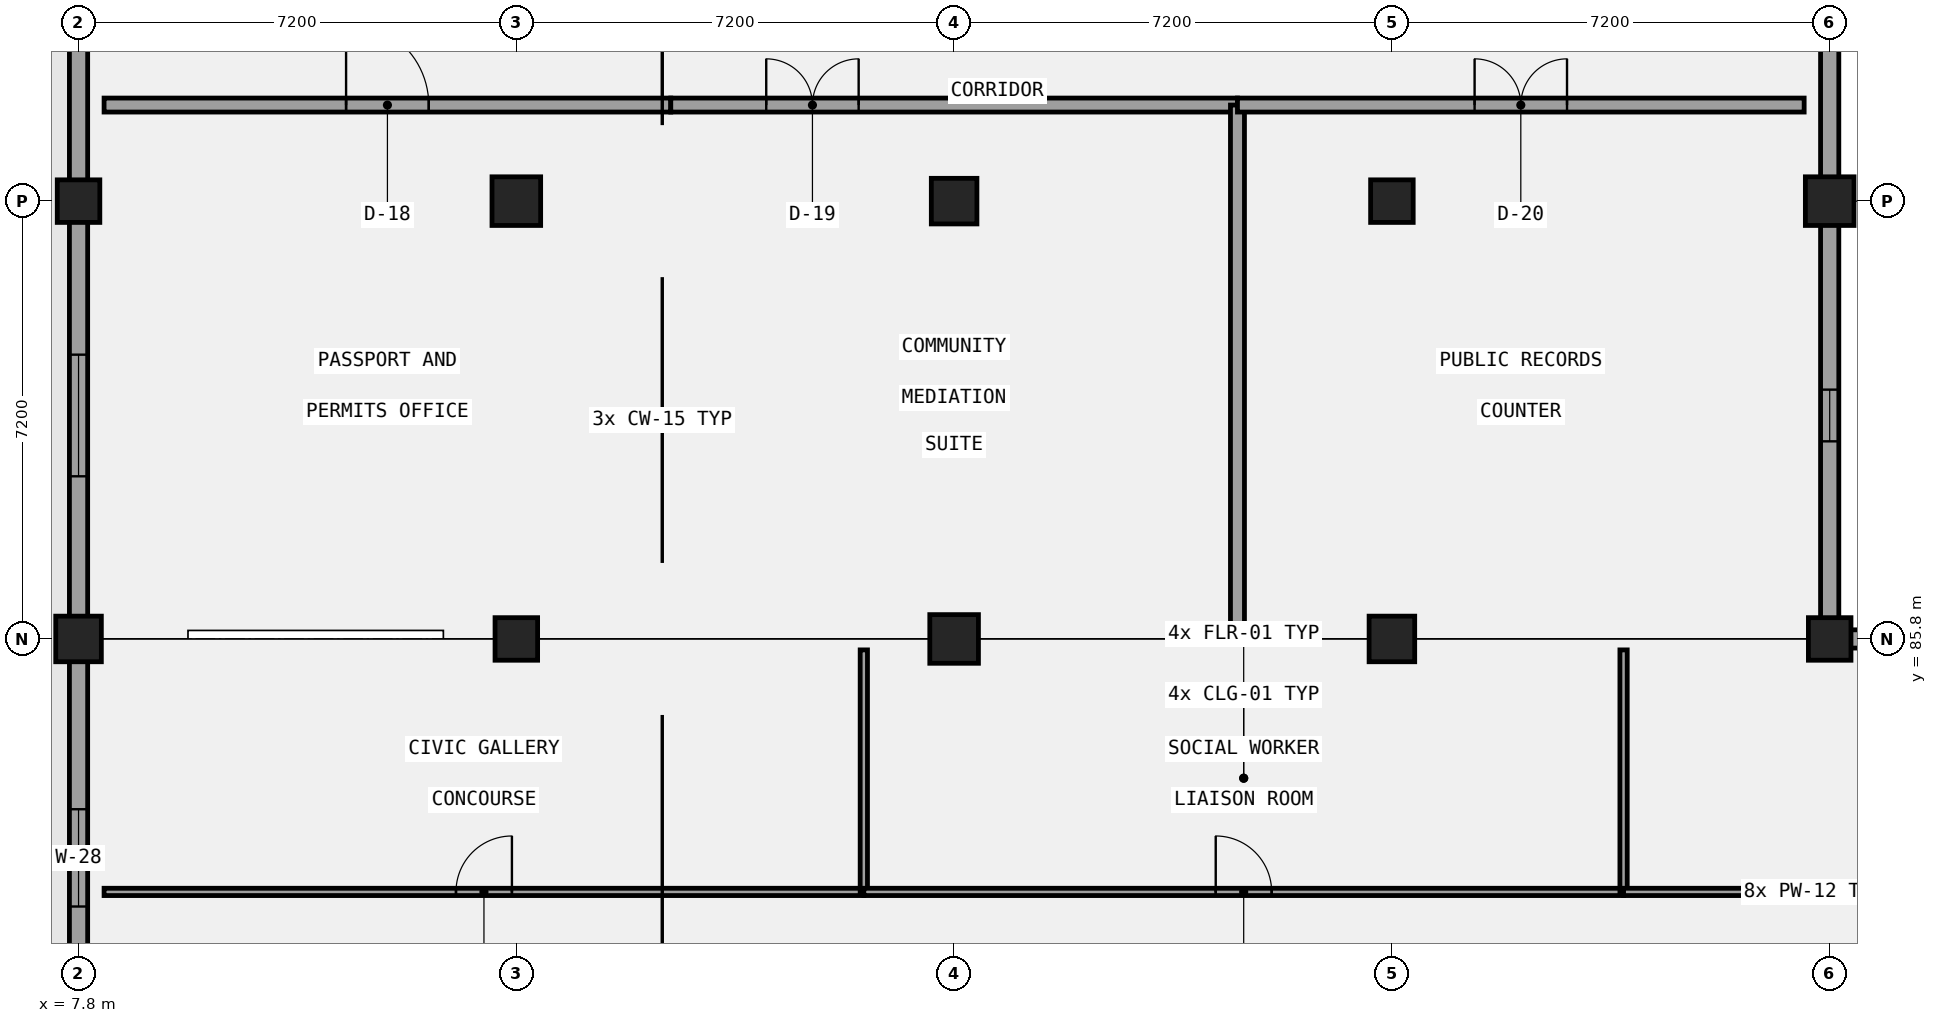
"""IFC4 building model, lengths in metres.
Left out: names, types, materials, properties, quantities, classifications, styles, units other than length and angle.
Written with IfcOpenShell. Run it as: python <this file> out.ifc"""

import sys

from ifc_helpers import new_model, si_unit, direction, frame, frame_2d, origin, origin_2d, place, context, subcontext, project, spatial, rectangle, extrude, element, fill, save


model = new_model("IFC4")
c1 = context("Model", 3, precision=1e-05, world=origin(), true_north=direction((0.0, 1.0)))
c2 = subcontext(c1, "Body", "Model", "MODEL_VIEW")
j1 = project(units=[si_unit("LENGTHUNIT", "METRE"), si_unit("PLANEANGLEUNIT", "RADIAN")], contexts=[c1])
p1 = place(None, origin())
s1 = spatial("IfcSite", under=j1, at=p1, CompositionType="ELEMENT")
p2 = place(p1, origin())
s2 = spatial("IfcBuilding", under=s1, at=p2, CompositionType="ELEMENT")
p3 = place(p2, frame((0.0, 0.0, 5.4)))
s3 = spatial("IfcBuildingStorey", under=s2, at=p3, CompositionType="ELEMENT", Elevation=5.4)
p4 = place(p3, frame((7.8, 85.8, 0.0), z_axis=(0.0, 0.0, 1.0), x_axis=(1.0, 0.0, 0.0)))
e1 = element("IfcColumn", 1, at=p4, inside=s3, PredefinedType="COLUMN", context=c2, shape_type="SweptSolid", body=[
    extrude(rectangle(XDim=0.75, YDim=0.75, at=origin_2d()), origin(), (0.0, 0.0, 1.0), 4.2),
])
for number, where, z_axis, x_axis in (
    (2, (7.8, 93.0, 0.0), (0.0, 0.0, 1.0), (1.0, 0.0, 0.0)),
    (3, (15.0, 85.8, 0.0), (0.0, 0.0, 1.0), (1.0, 0.0, 0.0)),
):
    element("IfcColumn", number, at=place(p3, frame(where, z_axis=z_axis, x_axis=x_axis)), inside=s3, PredefinedType="COLUMN", context=c2, shape_type="SweptSolid", body=[
        extrude(rectangle(XDim=0.7, YDim=0.7, at=origin_2d()), origin(), (0.0, 0.0, 1.0), 4.2),
    ])
for number, where, z_axis, x_axis in (
    (4, (15.0, 93.0, 0.0), (0.0, 0.0, 1.0), (1.0, 0.0, 0.0)),
    (5, (22.2, 85.8, 0.0), (0.0, 0.0, 1.0), (1.0, 0.0, 0.0)),
):
    element("IfcColumn", number, at=place(p3, frame(where, z_axis=z_axis, x_axis=x_axis)), inside=s3, PredefinedType="COLUMN", context=c2, shape_type="SweptSolid", body=[
        extrude(rectangle(XDim=0.8, YDim=0.8, at=origin_2d()), origin(), (0.0, 0.0, 1.0), 4.2),
    ])
for number, where, z_axis, x_axis in (
    (6, (22.2, 93.0, 0.0), (0.0, 0.0, 1.0), (1.0, 0.0, 0.0)),
    (7, (29.4, 85.8, 0.0), (0.0, 0.0, 1.0), (1.0, 0.0, 0.0)),
):
    element("IfcColumn", number, at=place(p3, frame(where, z_axis=z_axis, x_axis=x_axis)), inside=s3, PredefinedType="COLUMN", context=c2, shape_type="SweptSolid", body=[
        extrude(rectangle(XDim=0.75, YDim=0.75, at=origin_2d()), origin(), (0.0, 0.0, 1.0), 4.2),
    ])
for number, where, z_axis, x_axis in (
    (8, (29.4, 93.0, 0.0), (0.0, 0.0, 1.0), (1.0, 0.0, 0.0)),
    (9, (36.6, 85.8, 0.0), (0.0, 0.0, 1.0), (1.0, 0.0, 0.0)),
):
    element("IfcColumn", number, at=place(p3, frame(where, z_axis=z_axis, x_axis=x_axis)), inside=s3, PredefinedType="COLUMN", context=c2, shape_type="SweptSolid", body=[
        extrude(rectangle(XDim=0.7, YDim=0.7, at=origin_2d()), origin(), (0.0, 0.0, 1.0), 4.2),
    ])
p5 = place(p3, frame((36.6, 93.0, 0.0), z_axis=(0.0, 0.0, 1.0), x_axis=(1.0, 0.0, 0.0)))
e10 = element("IfcColumn", 10, at=p5, inside=s3, PredefinedType="COLUMN", context=c2, shape_type="SweptSolid", body=[
    extrude(rectangle(XDim=0.8, YDim=0.8, at=origin_2d()), origin(), (0.0, 0.0, 1.0), 4.2),
])
p6 = place(p3, frame((108.75, 85.8, 0.0), z_axis=(0.0, 0.0, 1.0), x_axis=(-1.0, 0.0, 0.0)))
e11 = element("IfcWall", 11, at=p6, inside=s3, PredefinedType="SOLIDWALL", context=c2, shape_type="SweptSolid", body=[
    extrude(rectangle(XDim=72.3, YDim=0.3, at=frame_2d((36.15, 0.0))), origin(), (0.0, 0.0, 1.0), 2.92),
])
p7 = place(p6, frame((68.125, 0.0, 1.0)))
e12 = element("IfcOpeningElement", 12, at=p7, cuts=e11, PredefinedType="OPENING", context=c2, shape_type="SweptSolid", body=[
    extrude(rectangle(XDim=0.85, YDim=1.4, at=frame_2d((0.425, 0.7))), frame((0.0, 0.16, 0.0), z_axis=(0.0, -1.0, 0.0), x_axis=(1.0, 0.0, 0.0)), (0.0, 0.0, 1.0), 0.32),
])
p8 = place(p6, frame((60.925, 0.0, 1.0)))
e13 = element("IfcOpeningElement", 13, at=p8, cuts=e11, PredefinedType="OPENING", context=c2, shape_type="SweptSolid", body=[
    extrude(rectangle(XDim=0.85, YDim=1.4, at=frame_2d((0.425, 0.7))), frame((0.0, 0.16, 0.0), z_axis=(0.0, -1.0, 0.0), x_axis=(1.0, 0.0, 0.0)), (0.0, 0.0, 1.0), 0.32),
])
p9 = place(p6, frame((53.725, 0.0, 1.0)))
e14 = element("IfcOpeningElement", 14, at=p9, cuts=e11, PredefinedType="OPENING", context=c2, shape_type="SweptSolid", body=[
    extrude(rectangle(XDim=0.85, YDim=1.4, at=frame_2d((0.425, 0.7))), frame((0.0, 0.16, 0.0), z_axis=(0.0, -1.0, 0.0), x_axis=(1.0, 0.0, 0.0)), (0.0, 0.0, 1.0), 0.32),
])
p10 = place(p6, frame((46.525, 0.0, 1.0)))
e15 = element("IfcOpeningElement", 15, at=p10, cuts=e11, PredefinedType="OPENING", context=c2, shape_type="SweptSolid", body=[
    extrude(rectangle(XDim=0.85, YDim=1.4, at=frame_2d((0.425, 0.7))), frame((0.0, 0.16, 0.0), z_axis=(0.0, -1.0, 0.0), x_axis=(1.0, 0.0, 0.0)), (0.0, 0.0, 1.0), 0.32),
])
p11 = place(p6, frame((39.325, 0.0, 1.0)))
e16 = element("IfcOpeningElement", 16, at=p11, cuts=e11, PredefinedType="OPENING", context=c2, shape_type="SweptSolid", body=[
    extrude(rectangle(XDim=0.85, YDim=1.4, at=frame_2d((0.425, 0.7))), frame((0.0, 0.16, 0.0), z_axis=(0.0, -1.0, 0.0), x_axis=(1.0, 0.0, 0.0)), (0.0, 0.0, 1.0), 0.32),
])
p12 = place(p6, frame((32.125, 0.0, 1.0)))
e17 = element("IfcOpeningElement", 17, at=p12, cuts=e11, PredefinedType="OPENING", context=c2, shape_type="SweptSolid", body=[
    extrude(rectangle(XDim=0.85, YDim=1.4, at=frame_2d((0.425, 0.7))), frame((0.0, 0.16, 0.0), z_axis=(0.0, -1.0, 0.0), x_axis=(1.0, 0.0, 0.0)), (0.0, 0.0, 1.0), 0.32),
])
p13 = place(p6, frame((24.925, 0.0, 1.0)))
e18 = element("IfcOpeningElement", 18, at=p13, cuts=e11, PredefinedType="OPENING", context=c2, shape_type="SweptSolid", body=[
    extrude(rectangle(XDim=0.85, YDim=1.4, at=frame_2d((0.425, 0.7))), frame((0.0, 0.16, 0.0), z_axis=(0.0, -1.0, 0.0), x_axis=(1.0, 0.0, 0.0)), (0.0, 0.0, 1.0), 0.32),
])
p14 = place(p6, frame((17.725, 0.0, 1.0)))
e19 = element("IfcOpeningElement", 19, at=p14, cuts=e11, PredefinedType="OPENING", context=c2, shape_type="SweptSolid", body=[
    extrude(rectangle(XDim=0.85, YDim=1.4, at=frame_2d((0.425, 0.7))), frame((0.0, 0.16, 0.0), z_axis=(0.0, -1.0, 0.0), x_axis=(1.0, 0.0, 0.0)), (0.0, 0.0, 1.0), 0.32),
])
p15 = place(p6, frame((10.525, 0.0, 1.0)))
e20 = element("IfcOpeningElement", 20, at=p15, cuts=e11, PredefinedType="OPENING", context=c2, shape_type="SweptSolid", body=[
    extrude(rectangle(XDim=0.85, YDim=1.4, at=frame_2d((0.425, 0.7))), frame((0.0, 0.16, 0.0), z_axis=(0.0, -1.0, 0.0), x_axis=(1.0, 0.0, 0.0)), (0.0, 0.0, 1.0), 0.32),
])
p16 = place(p6, frame((3.325, 0.0, 1.0)))
e21 = element("IfcOpeningElement", 21, at=p16, cuts=e11, PredefinedType="OPENING", context=c2, shape_type="SweptSolid", body=[
    extrude(rectangle(XDim=0.85, YDim=1.4, at=frame_2d((0.425, 0.7))), frame((0.0, 0.16, 0.0), z_axis=(0.0, -1.0, 0.0), x_axis=(1.0, 0.0, 0.0)), (0.0, 0.0, 1.0), 0.32),
])
p17 = place(p3, frame((36.6, 85.95, 0.0), z_axis=(0.0, 0.0, 1.0), x_axis=(0.0, 1.0, 0.0)))
e22 = element("IfcWall", 22, at=p17, inside=s3, PredefinedType="SOLIDWALL", context=c2, shape_type="SweptSolid", body=[
    extrude(rectangle(XDim=21.3, YDim=0.3, at=frame_2d((10.65, 0.0))), origin(), (0.0, 0.0, 1.0), 3.02),
])
p18 = place(p17, frame((3.1, 0.0, 1.0)))
e23 = element("IfcOpeningElement", 23, at=p18, cuts=e22, PredefinedType="OPENING", context=c2, shape_type="SweptSolid", body=[
    extrude(rectangle(XDim=0.85, YDim=1.65, at=frame_2d((0.425, 0.825))), frame((0.0, 0.16, 0.0), z_axis=(0.0, -1.0, 0.0), x_axis=(1.0, 0.0, 0.0)), (0.0, 0.0, 1.0), 0.32),
])
p19 = place(p17, frame((10.225, 0.0, 1.0)))
e24 = element("IfcOpeningElement", 24, at=p19, cuts=e22, PredefinedType="OPENING", context=c2, shape_type="SweptSolid", body=[
    extrude(rectangle(XDim=0.85, YDim=1.65, at=frame_2d((0.425, 0.825))), frame((0.0, 0.16, 0.0), z_axis=(0.0, -1.0, 0.0), x_axis=(1.0, 0.0, 0.0)), (0.0, 0.0, 1.0), 0.32),
])
p20 = place(p17, frame((17.35, 0.0, 1.0)))
e25 = element("IfcOpeningElement", 25, at=p20, cuts=e22, PredefinedType="OPENING", context=c2, shape_type="SweptSolid", body=[
    extrude(rectangle(XDim=0.85, YDim=1.65, at=frame_2d((0.425, 0.825))), frame((0.0, 0.16, 0.0), z_axis=(0.0, -1.0, 0.0), x_axis=(1.0, 0.0, 0.0)), (0.0, 0.0, 1.0), 0.32),
])
p21 = place(p3, frame((7.8, 107.25, 0.0), z_axis=(0.0, 0.0, 1.0), x_axis=(0.0, -1.0, 0.0)))
e26 = element("IfcWall", 26, at=p21, inside=s3, PredefinedType="SOLIDWALL", context=c2, shape_type="SweptSolid", body=[
    extrude(rectangle(XDim=21.3, YDim=0.3, at=frame_2d((10.65, 0.0))), origin(), (0.0, 0.0, 1.0), 3.17),
])
p22 = place(p21, frame((16.775, 0.0, 1.0)))
e27 = element("IfcOpeningElement", 27, at=p22, cuts=e26, PredefinedType="OPENING", context=c2, shape_type="SweptSolid", body=[
    extrude(rectangle(XDim=2.0, YDim=1.4, at=frame_2d((1.0, 0.7))), frame((0.0, 0.16, 0.0), z_axis=(0.0, -1.0, 0.0), x_axis=(1.0, 0.0, 0.0)), (0.0, 0.0, 1.0), 0.32),
])
p23 = place(p21, frame((9.65, 0.0, 1.0)))
e28 = element("IfcOpeningElement", 28, at=p23, cuts=e26, PredefinedType="OPENING", context=c2, shape_type="SweptSolid", body=[
    extrude(rectangle(XDim=2.0, YDim=1.4, at=frame_2d((1.0, 0.7))), frame((0.0, 0.16, 0.0), z_axis=(0.0, -1.0, 0.0), x_axis=(1.0, 0.0, 0.0)), (0.0, 0.0, 1.0), 0.32),
])
p24 = place(p21, frame((2.525, 0.0, 1.0)))
e29 = element("IfcOpeningElement", 29, at=p24, cuts=e26, PredefinedType="OPENING", context=c2, shape_type="SweptSolid", body=[
    extrude(rectangle(XDim=2.0, YDim=1.4, at=frame_2d((1.0, 0.7))), frame((0.0, 0.16, 0.0), z_axis=(0.0, -1.0, 0.0), x_axis=(1.0, 0.0, 0.0)), (0.0, 0.0, 1.0), 0.32),
])
p25 = place(p3, frame((7.8, 85.65, 0.0), z_axis=(0.0, 0.0, 1.0), x_axis=(0.0, -1.0, 0.0)))
e30 = element("IfcWall", 30, at=p25, inside=s3, PredefinedType="SOLIDWALL", context=c2, shape_type="SweptSolid", body=[
    extrude(rectangle(XDim=6.9, YDim=0.3, at=frame_2d((3.45, 0.0))), origin(), (0.0, 0.0, 1.0), 3.37),
])
p26 = place(p25, frame((2.65, 0.0, 1.0)))
e31 = element("IfcOpeningElement", 31, at=p26, cuts=e30, PredefinedType="OPENING", context=c2, shape_type="SweptSolid", body=[
    extrude(rectangle(XDim=1.6, YDim=1.9, at=frame_2d((0.8, 0.95))), frame((0.0, 0.16, 0.0), z_axis=(0.0, -1.0, 0.0), x_axis=(1.0, 0.0, 0.0)), (0.0, 0.0, 1.0), 0.32),
])
p27 = place(p3, frame((8.22, 94.58, 0.0), z_axis=(0.0, 0.0, 1.0), x_axis=(1.0, 0.0, 0.0)))
e32 = element("IfcWall", 32, at=p27, inside=s3, PredefinedType="PARTITIONING", context=c2, shape_type="SweptSolid", body=[
    extrude(rectangle(XDim=9.32, YDim=0.23, at=frame_2d((4.66, 0.0))), origin(), (0.0, 0.0, 1.0), 3.37),
])
p28 = place(p27, frame((3.98, 0.0, 0.0)))
e33 = element("IfcOpeningElement", 33, at=p28, cuts=e32, PredefinedType="OPENING", context=c2, shape_type="SweptSolid", body=[
    extrude(rectangle(XDim=1.36, YDim=2.35, at=frame_2d((0.68, 1.175))), frame((0.0, 0.125, 0.0), z_axis=(0.0, -1.0, 0.0), x_axis=(1.0, 0.0, 0.0)), (0.0, 0.0, 1.0), 0.25),
])
p29 = place(p3, frame((17.54, 94.58, 0.0), z_axis=(0.0, 0.0, 1.0), x_axis=(1.0, 0.0, 0.0)))
e34 = element("IfcWall", 34, at=p29, inside=s3, PredefinedType="PARTITIONING", context=c2, shape_type="SweptSolid", body=[
    extrude(rectangle(XDim=9.32, YDim=0.23, at=frame_2d((4.66, 0.0))), origin(), (0.0, 0.0, 1.0), 3.37),
])
p30 = place(p29, frame((1.57, 0.0, 0.0)))
e35 = element("IfcOpeningElement", 35, at=p30, cuts=e34, PredefinedType="OPENING", context=c2, shape_type="SweptSolid", body=[
    extrude(rectangle(XDim=1.52, YDim=2.1, at=frame_2d((0.76, 1.05))), frame((0.0, 0.125, 0.0), z_axis=(0.0, -1.0, 0.0), x_axis=(1.0, 0.0, 0.0)), (0.0, 0.0, 1.0), 0.25),
])
p31 = place(p3, frame((26.86, 85.98, 0.0), z_axis=(0.0, 0.0, 1.0), x_axis=(0.0, 1.0, 0.0)))
e36 = element("IfcWall", 36, at=p31, inside=s3, PredefinedType="PARTITIONING", context=c2, shape_type="SweptSolid", body=[
    extrude(rectangle(XDim=8.6, YDim=0.23, at=frame_2d((4.3, 0.0))), origin(), (0.0, 0.0, 1.0), 3.92),
])
p32 = place(p3, frame((26.86, 94.58, 0.0), z_axis=(0.0, 0.0, 1.0), x_axis=(1.0, 0.0, 0.0)))
e37 = element("IfcWall", 37, at=p32, inside=s3, PredefinedType="PARTITIONING", context=c2, shape_type="SweptSolid", body=[
    extrude(rectangle(XDim=9.32, YDim=0.23, at=frame_2d((4.66, 0.0))), origin(), (0.0, 0.0, 1.0), 3.37),
])
p33 = place(p32, frame((3.9, 0.0, 0.0)))
e38 = element("IfcOpeningElement", 38, at=p33, cuts=e37, PredefinedType="OPENING", context=c2, shape_type="SweptSolid", body=[
    extrude(rectangle(XDim=1.52, YDim=2.22, at=frame_2d((0.76, 1.11))), frame((0.0, 0.125, 0.0), z_axis=(0.0, -1.0, 0.0), x_axis=(1.0, 0.0, 0.0)), (0.0, 0.0, 1.0), 0.25),
])
p34 = place(p3, frame((8.22, 81.64, 0.0), z_axis=(0.0, 0.0, 1.0), x_axis=(1.0, 0.0, 0.0)))
e39 = element("IfcWall", 39, at=p34, inside=s3, PredefinedType="PARTITIONING", context=c2, shape_type="SweptSolid", body=[
    extrude(rectangle(XDim=12.495, YDim=0.12, at=frame_2d((6.248, 0.0))), origin(), (0.0, 0.0, 1.0), 3.92),
])
p35 = place(p34, frame((5.788, 0.0, 0.0)))
e40 = element("IfcOpeningElement", 40, at=p35, cuts=e39, PredefinedType="OPENING", context=c2, shape_type="SweptSolid", body=[
    extrude(rectangle(XDim=0.92, YDim=2.1, at=frame_2d((0.46, 1.05))), frame((0.0, 0.07, 0.0), z_axis=(0.0, -1.0, 0.0), x_axis=(1.0, 0.0, 0.0)), (0.0, 0.0, 1.0), 0.14),
])
p36 = place(p3, frame((20.715, 81.64, 0.0), z_axis=(0.0, 0.0, 1.0), x_axis=(0.0, 1.0, 0.0)))
e41 = element("IfcWall", 41, at=p36, inside=s3, PredefinedType="PARTITIONING", context=c2, shape_type="SweptSolid", body=[
    extrude(rectangle(XDim=3.98, YDim=0.12, at=frame_2d((1.99, 0.0))), origin(), (0.0, 0.0, 1.0), 3.92),
])
p37 = place(p3, frame((20.715, 81.64, 0.0), z_axis=(0.0, 0.0, 1.0), x_axis=(1.0, 0.0, 0.0)))
e42 = element("IfcWall", 42, at=p37, inside=s3, PredefinedType="PARTITIONING", context=c2, shape_type="SweptSolid", body=[
    extrude(rectangle(XDim=12.495, YDim=0.12, at=frame_2d((6.248, 0.0))), origin(), (0.0, 0.0, 1.0), 3.92),
])
p38 = place(p37, frame((5.788, 0.0, 0.0)))
e43 = element("IfcOpeningElement", 43, at=p38, cuts=e42, PredefinedType="OPENING", context=c2, shape_type="SweptSolid", body=[
    extrude(rectangle(XDim=0.92, YDim=2.22, at=frame_2d((0.46, 1.11))), frame((0.0, 0.07, 0.0), z_axis=(0.0, -1.0, 0.0), x_axis=(1.0, 0.0, 0.0)), (0.0, 0.0, 1.0), 0.14),
])
p39 = place(p3, frame((33.21, 81.64, 0.0), z_axis=(0.0, 0.0, 1.0), x_axis=(0.0, 1.0, 0.0)))
e44 = element("IfcWall", 44, at=p39, inside=s3, PredefinedType="PARTITIONING", context=c2, shape_type="SweptSolid", body=[
    extrude(rectangle(XDim=3.98, YDim=0.12, at=frame_2d((1.99, 0.0))), origin(), (0.0, 0.0, 1.0), 3.92),
])
p40 = place(p3, frame((33.21, 81.64, 0.0), z_axis=(0.0, 0.0, 1.0), x_axis=(1.0, 0.0, 0.0)))
e45 = element("IfcWall", 45, at=p40, inside=s3, PredefinedType="PARTITIONING", context=c2, shape_type="SweptSolid", body=[
    extrude(rectangle(XDim=12.495, YDim=0.12, at=frame_2d((6.248, 0.0))), origin(), (0.0, 0.0, 1.0), 3.92),
])
p41 = place(p40, frame((5.788, 0.0, 0.0)))
e46 = element("IfcOpeningElement", 46, at=p41, cuts=e45, PredefinedType="OPENING", context=c2, shape_type="SweptSolid", body=[
    extrude(rectangle(XDim=0.92, YDim=2.35, at=frame_2d((0.46, 1.175))), frame((0.0, 0.07, 0.0), z_axis=(0.0, -1.0, 0.0), x_axis=(1.0, 0.0, 0.0)), (0.0, 0.0, 1.0), 0.14),
])
p42 = place(p18, origin())
e47 = element("IfcWindow", 47, at=p42, inside=s3, PartitioningType="SINGLE_PANEL", PredefinedType="WINDOW", context=c2, shape_type="SweptSolid", body=[
    extrude(rectangle(XDim=0.85, YDim=1.65, at=frame_2d((0.425, 0.825))), frame((0.0, 0.03, 0.0), z_axis=(0.0, -1.0, 0.0), x_axis=(1.0, 0.0, 0.0)), (0.0, 0.0, 1.0), 0.06),
])
fill(e23, e47)
p43 = place(p22, origin())
e48 = element("IfcWindow", 48, at=p43, inside=s3, PartitioningType="SINGLE_PANEL", PredefinedType="WINDOW", context=c2, shape_type="SweptSolid", body=[
    extrude(rectangle(XDim=2.0, YDim=1.4, at=frame_2d((1.0, 0.7))), frame((0.0, 0.03, 0.0), z_axis=(0.0, -1.0, 0.0), x_axis=(1.0, 0.0, 0.0)), (0.0, 0.0, 1.0), 0.06),
])
fill(e27, e48)
p44 = place(p26, origin())
e49 = element("IfcWindow", 49, at=p44, inside=s3, PartitioningType="SINGLE_PANEL", PredefinedType="WINDOW", context=c2, shape_type="SweptSolid", body=[
    extrude(rectangle(XDim=1.6, YDim=1.9, at=frame_2d((0.8, 0.95))), frame((0.0, 0.03, 0.0), z_axis=(0.0, -1.0, 0.0), x_axis=(1.0, 0.0, 0.0)), (0.0, 0.0, 1.0), 0.06),
])
fill(e31, e49)
p45 = place(p28, frame((1.36, 0.0, 0.0), z_axis=(0.0, 0.0, 1.0), x_axis=(-1.0, 0.0, 0.0)))
e50 = element("IfcDoor", 50, at=p45, inside=s3, OperationType="SINGLE_SWING_LEFT", PredefinedType="DOOR", context=c2, shape_type="SweptSolid", body=[
    extrude(rectangle(XDim=1.36, YDim=2.35, at=frame_2d((0.68, 1.175))), frame((0.0, 0.025, 0.0), z_axis=(0.0, -1.0, 0.0), x_axis=(1.0, 0.0, 0.0)), (0.0, 0.0, 1.0), 0.05),
])
fill(e33, e50)
p46 = place(p30, frame((1.52, 0.0, 0.0), z_axis=(0.0, 0.0, 1.0), x_axis=(-1.0, 0.0, 0.0)))
e51 = element("IfcDoor", 51, at=p46, inside=s3, OperationType="DOUBLE_DOOR_SINGLE_SWING", PredefinedType="DOOR", context=c2, shape_type="SweptSolid", body=[
    extrude(rectangle(XDim=1.52, YDim=2.1, at=frame_2d((0.76, 1.05))), frame((0.0, 0.025, 0.0), z_axis=(0.0, -1.0, 0.0), x_axis=(1.0, 0.0, 0.0)), (0.0, 0.0, 1.0), 0.05),
])
fill(e35, e51)
p47 = place(p33, frame((1.52, 0.0, 0.0), z_axis=(0.0, 0.0, 1.0), x_axis=(-1.0, 0.0, 0.0)))
e52 = element("IfcDoor", 52, at=p47, inside=s3, OperationType="DOUBLE_DOOR_SINGLE_SWING", PredefinedType="DOOR", context=c2, shape_type="SweptSolid", body=[
    extrude(rectangle(XDim=1.52, YDim=2.22, at=frame_2d((0.76, 1.11))), frame((0.0, 0.025, 0.0), z_axis=(0.0, -1.0, 0.0), x_axis=(1.0, 0.0, 0.0)), (0.0, 0.0, 1.0), 0.05),
])
fill(e38, e52)
p48 = place(p35, origin())
e53 = element("IfcDoor", 53, at=p48, inside=s3, OperationType="SINGLE_SWING_RIGHT", PredefinedType="DOOR", context=c2, shape_type="SweptSolid", body=[
    extrude(rectangle(XDim=0.92, YDim=2.1, at=frame_2d((0.46, 1.05))), frame((0.0, 0.025, 0.0), z_axis=(0.0, -1.0, 0.0), x_axis=(1.0, 0.0, 0.0)), (0.0, 0.0, 1.0), 0.05),
])
fill(e40, e53)
p49 = place(p38, origin())
e54 = element("IfcDoor", 54, at=p49, inside=s3, OperationType="SINGLE_SWING_LEFT", PredefinedType="DOOR", context=c2, shape_type="SweptSolid", body=[
    extrude(rectangle(XDim=0.92, YDim=2.22, at=frame_2d((0.46, 1.11))), frame((0.0, 0.025, 0.0), z_axis=(0.0, -1.0, 0.0), x_axis=(1.0, 0.0, 0.0)), (0.0, 0.0, 1.0), 0.05),
])
fill(e43, e54)
save(model, sys.argv[1])
